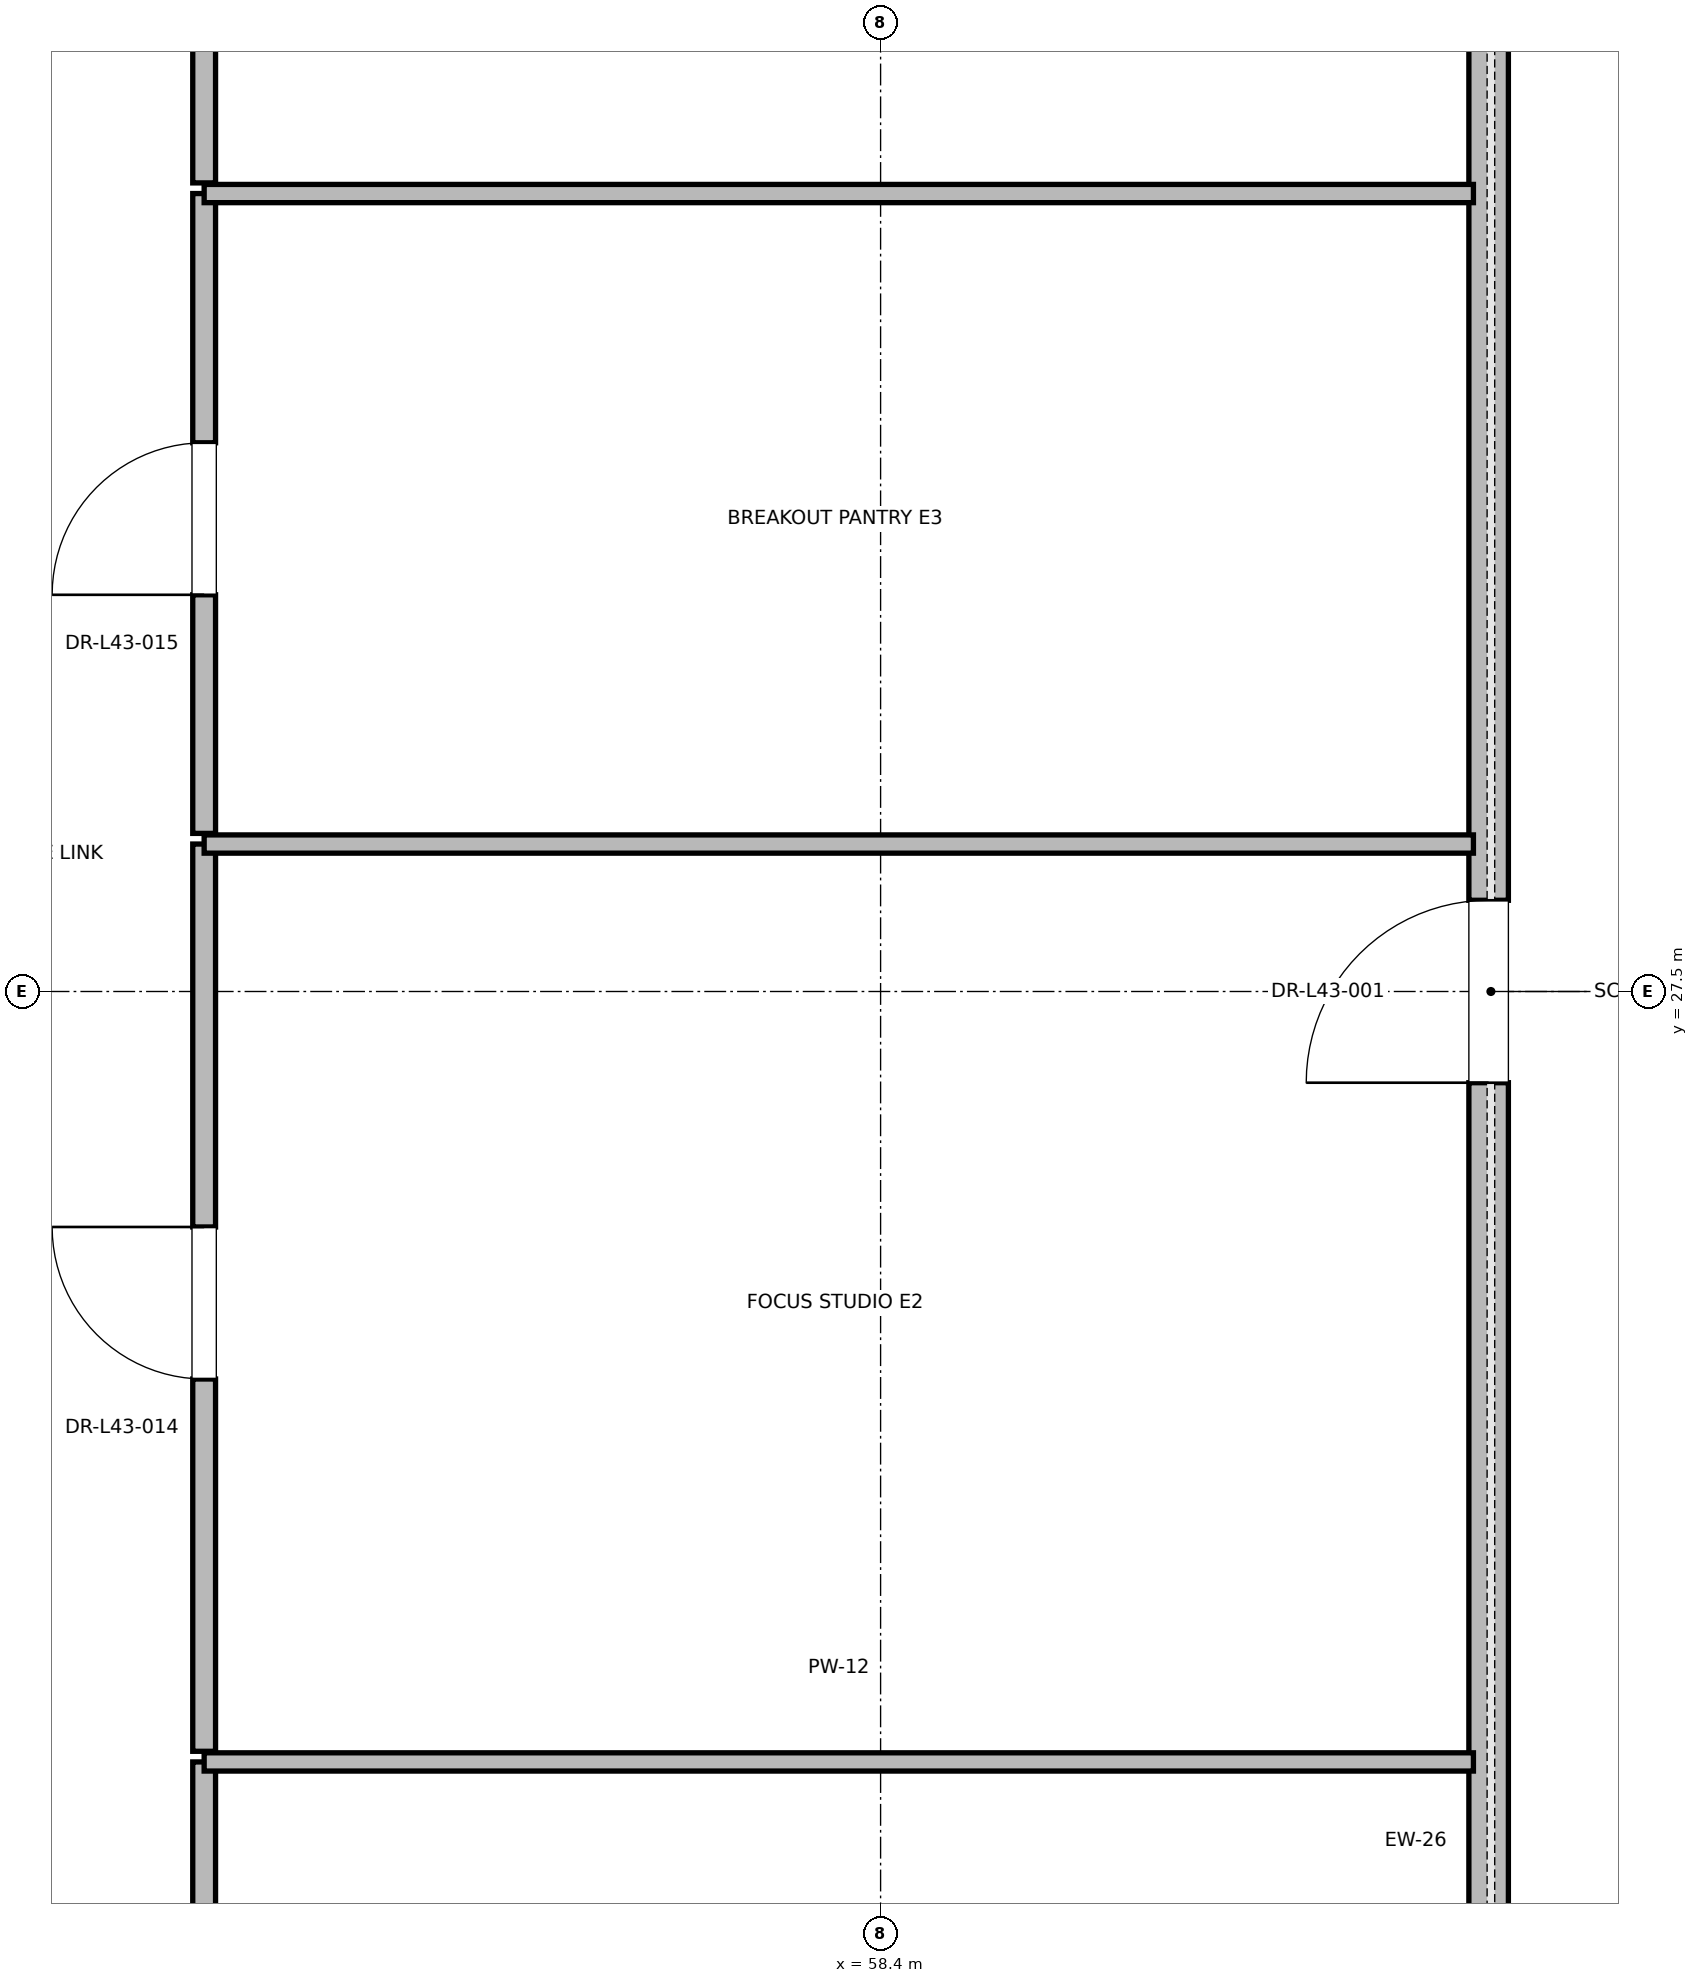
"""IFC4 building model, lengths in metres.
Left out: names, types, materials, properties, quantities, classifications, styles, units other than length and angle.
Written with IfcOpenShell. Run it as: python <this file> out.ifc"""

import sys

from ifc_helpers import new_model, si_unit, direction, frame, frame_2d, origin, place, context, subcontext, project, spatial, rectangle, extrude, element, fill, save


model = new_model("IFC4")
c1 = context("Model", 3, precision=1e-05, world=origin(), true_north=direction((0.0, 1.0)))
c2 = subcontext(c1, "Body", "Model", "MODEL_VIEW")
j1 = project(units=[si_unit("LENGTHUNIT", "METRE"), si_unit("PLANEANGLEUNIT", "RADIAN")], contexts=[c1])
p1 = place(None, origin())
s1 = spatial("IfcSite", under=j1, at=p1, CompositionType="ELEMENT")
p2 = place(p1, origin())
s2 = spatial("IfcBuilding", under=s1, at=p2, CompositionType="ELEMENT")
p3 = place(p2, frame((0.0, 0.0, 184.4)))
s3 = spatial("IfcBuildingStorey", under=s2, at=p3, CompositionType="ELEMENT", Elevation=184.4)
p4 = place(p3, frame((62.4, 10.3, 0.0), z_axis=(0.0, 0.0, 1.0), x_axis=(0.0, 1.0, 0.0)))
e1 = element("IfcWall", 1, at=p4, inside=s3, PredefinedType="PARAPET", context=c2, shape_type="SweptSolid", body=[
    extrude(rectangle(XDim=34.4, YDim=0.26, at=frame_2d((17.2, 0.0))), origin(), (0.0, 0.0, 1.0), 3.753),
])
p5 = place(p4, frame((4.2, 0.0, 0.85)))
e2 = element("IfcOpeningElement", 2, at=p5, cuts=e1, PredefinedType="OPENING", context=c2, shape_type="SweptSolid", body=[
    extrude(rectangle(XDim=2.0, YDim=2.3, at=frame_2d((1.0, 1.15))), frame((0.0, 0.13, 0.0), z_axis=(0.0, -1.0, 0.0), x_axis=(1.0, 0.0, 0.0)), (0.0, 0.0, 1.0), 0.26),
])
p6 = place(p4, frame((16.6, 0.0, 0.0)))
e3 = element("IfcOpeningElement", 3, at=p6, cuts=e1, PredefinedType="OPENING", context=c2, shape_type="SweptSolid", body=[
    extrude(rectangle(XDim=1.2, YDim=2.2, at=frame_2d((0.6, 1.1))), frame((0.0, 0.13, 0.0), z_axis=(0.0, -1.0, 0.0), x_axis=(1.0, 0.0, 0.0)), (0.0, 0.0, 1.0), 0.26),
])
p7 = place(p4, frame((28.2, 0.0, 0.85)))
e4 = element("IfcOpeningElement", 4, at=p7, cuts=e1, PredefinedType="OPENING", context=c2, shape_type="SweptSolid", body=[
    extrude(rectangle(XDim=2.0, YDim=2.3, at=frame_2d((1.0, 1.15))), frame((0.0, 0.13, 0.0), z_axis=(0.0, -1.0, 0.0), x_axis=(1.0, 0.0, 0.0)), (0.0, 0.0, 1.0), 0.26),
])
p8 = place(p3, frame((53.95, 18.45, 0.0), z_axis=(0.0, 0.0, 1.0), x_axis=(0.0, 1.0, 0.0)))
e5 = element("IfcWall", 5, at=p8, inside=s3, PredefinedType="PARTITIONING", context=c2, shape_type="SweptSolid", body=[
    extrude(rectangle(XDim=3.982, YDim=0.15, at=frame_2d((1.991, 0.0))), origin(), (0.0, 0.0, 1.0), 2.85),
])
p9 = place(p8, frame((1.531, 0.0, 0.0)))
e6 = element("IfcOpeningElement", 6, at=p9, cuts=e5, PredefinedType="OPENING", context=c2, shape_type="SweptSolid", body=[
    extrude(rectangle(XDim=1.0, YDim=2.15, at=frame_2d((0.5, 1.075))), frame((0.0, 0.075, 0.0), z_axis=(0.0, -1.0, 0.0), x_axis=(1.0, 0.0, 0.0)), (0.0, 0.0, 1.0), 0.15),
])
p10 = place(p3, frame((53.95, 22.432, 0.0), z_axis=(0.0, 0.0, 1.0), x_axis=(1.0, 0.0, 0.0)))
e7 = element("IfcWall", 7, at=p10, inside=s3, PredefinedType="PARTITIONING", context=c2, shape_type="SweptSolid", body=[
    extrude(rectangle(XDim=8.35, YDim=0.12, at=frame_2d((4.175, 0.0))), origin(), (0.0, 0.0, 1.0), 2.85),
])
p11 = place(p3, frame((53.95, 22.502, 0.0), z_axis=(0.0, 0.0, 1.0), x_axis=(0.0, 1.0, 0.0)))
e8 = element("IfcWall", 8, at=p11, inside=s3, PredefinedType="PARTITIONING", context=c2, shape_type="SweptSolid", body=[
    extrude(rectangle(XDim=5.968, YDim=0.15, at=frame_2d((2.984, 0.0))), origin(), (0.0, 0.0, 1.0), 2.85),
])
p12 = place(p11, frame((2.449, 0.0, 0.0)))
e9 = element("IfcOpeningElement", 9, at=p12, cuts=e8, PredefinedType="OPENING", context=c2, shape_type="SweptSolid", body=[
    extrude(rectangle(XDim=1.0, YDim=2.15, at=frame_2d((0.5, 1.075))), frame((0.0, 0.075, 0.0), z_axis=(0.0, -1.0, 0.0), x_axis=(1.0, 0.0, 0.0)), (0.0, 0.0, 1.0), 0.15),
])
p13 = place(p3, frame((53.95, 28.47, 0.0), z_axis=(0.0, 0.0, 1.0), x_axis=(1.0, 0.0, 0.0)))
e10 = element("IfcWall", 10, at=p13, inside=s3, PredefinedType="PARTITIONING", context=c2, shape_type="SweptSolid", body=[
    extrude(rectangle(XDim=8.35, YDim=0.12, at=frame_2d((4.175, 0.0))), origin(), (0.0, 0.0, 1.0), 2.85),
])
p14 = place(p3, frame((53.95, 28.54, 0.0), z_axis=(0.0, 0.0, 1.0), x_axis=(0.0, 1.0, 0.0)))
e11 = element("IfcWall", 11, at=p14, inside=s3, PredefinedType="PARTITIONING", context=c2, shape_type="SweptSolid", body=[
    extrude(rectangle(XDim=4.209, YDim=0.15, at=frame_2d((2.104, 0.0))), origin(), (0.0, 0.0, 1.0), 2.85),
])
p15 = place(p14, frame((1.57, 0.0, 0.0)))
e12 = element("IfcOpeningElement", 12, at=p15, cuts=e11, PredefinedType="OPENING", context=c2, shape_type="SweptSolid", body=[
    extrude(rectangle(XDim=1.0, YDim=2.15, at=frame_2d((0.5, 1.075))), frame((0.0, 0.075, 0.0), z_axis=(0.0, -1.0, 0.0), x_axis=(1.0, 0.0, 0.0)), (0.0, 0.0, 1.0), 0.15),
])
p16 = place(p3, frame((53.95, 32.749, 0.0), z_axis=(0.0, 0.0, 1.0), x_axis=(1.0, 0.0, 0.0)))
e13 = element("IfcWall", 13, at=p16, inside=s3, PredefinedType="PARTITIONING", context=c2, shape_type="SweptSolid", body=[
    extrude(rectangle(XDim=8.35, YDim=0.12, at=frame_2d((4.175, 0.0))), origin(), (0.0, 0.0, 1.0), 2.85),
])
p17 = place(p3, frame((53.95, 32.819, 0.0), z_axis=(0.0, 0.0, 1.0), x_axis=(0.0, 1.0, 0.0)))
e14 = element("IfcWall", 14, at=p17, inside=s3, PredefinedType="PARTITIONING", context=c2, shape_type="SweptSolid", body=[
    extrude(rectangle(XDim=3.731, YDim=0.15, at=frame_2d((1.865, 0.0))), origin(), (0.0, 0.0, 1.0), 2.85),
])
p18 = place(p17, frame((1.291, 0.0, 0.0)))
e15 = element("IfcOpeningElement", 15, at=p18, cuts=e14, PredefinedType="OPENING", context=c2, shape_type="SweptSolid", body=[
    extrude(rectangle(XDim=1.0, YDim=2.15, at=frame_2d((0.5, 1.075))), frame((0.0, 0.075, 0.0), z_axis=(0.0, -1.0, 0.0), x_axis=(1.0, 0.0, 0.0)), (0.0, 0.0, 1.0), 0.15),
])
p19 = place(p6, origin())
e16 = element("IfcDoor", 16, at=p19, inside=s3, OperationType="SINGLE_SWING_LEFT", PredefinedType="DOOR", context=c2, shape_type="SweptSolid", body=[
    extrude(rectangle(XDim=1.2, YDim=2.2, at=frame_2d((0.6, 1.1))), frame((0.0, 0.025, 0.0), z_axis=(0.0, -1.0, 0.0), x_axis=(1.0, 0.0, 0.0)), (0.0, 0.0, 1.0), 0.05),
])
fill(e3, e16)
p20 = place(p12, origin())
e17 = element("IfcDoor", 17, at=p20, inside=s3, OperationType="SINGLE_SWING_RIGHT", PredefinedType="DOOR", context=c2, shape_type="SweptSolid", body=[
    extrude(rectangle(XDim=1.0, YDim=2.15, at=frame_2d((0.5, 1.075))), frame((0.0, 0.025, 0.0), z_axis=(0.0, -1.0, 0.0), x_axis=(1.0, 0.0, 0.0)), (0.0, 0.0, 1.0), 0.05),
])
fill(e9, e17)
p21 = place(p15, origin())
e18 = element("IfcDoor", 18, at=p21, inside=s3, OperationType="SINGLE_SWING_LEFT", PredefinedType="DOOR", context=c2, shape_type="SweptSolid", body=[
    extrude(rectangle(XDim=1.0, YDim=2.15, at=frame_2d((0.5, 1.075))), frame((0.0, 0.025, 0.0), z_axis=(0.0, -1.0, 0.0), x_axis=(1.0, 0.0, 0.0)), (0.0, 0.0, 1.0), 0.05),
])
fill(e12, e18)
save(model, sys.argv[1])
